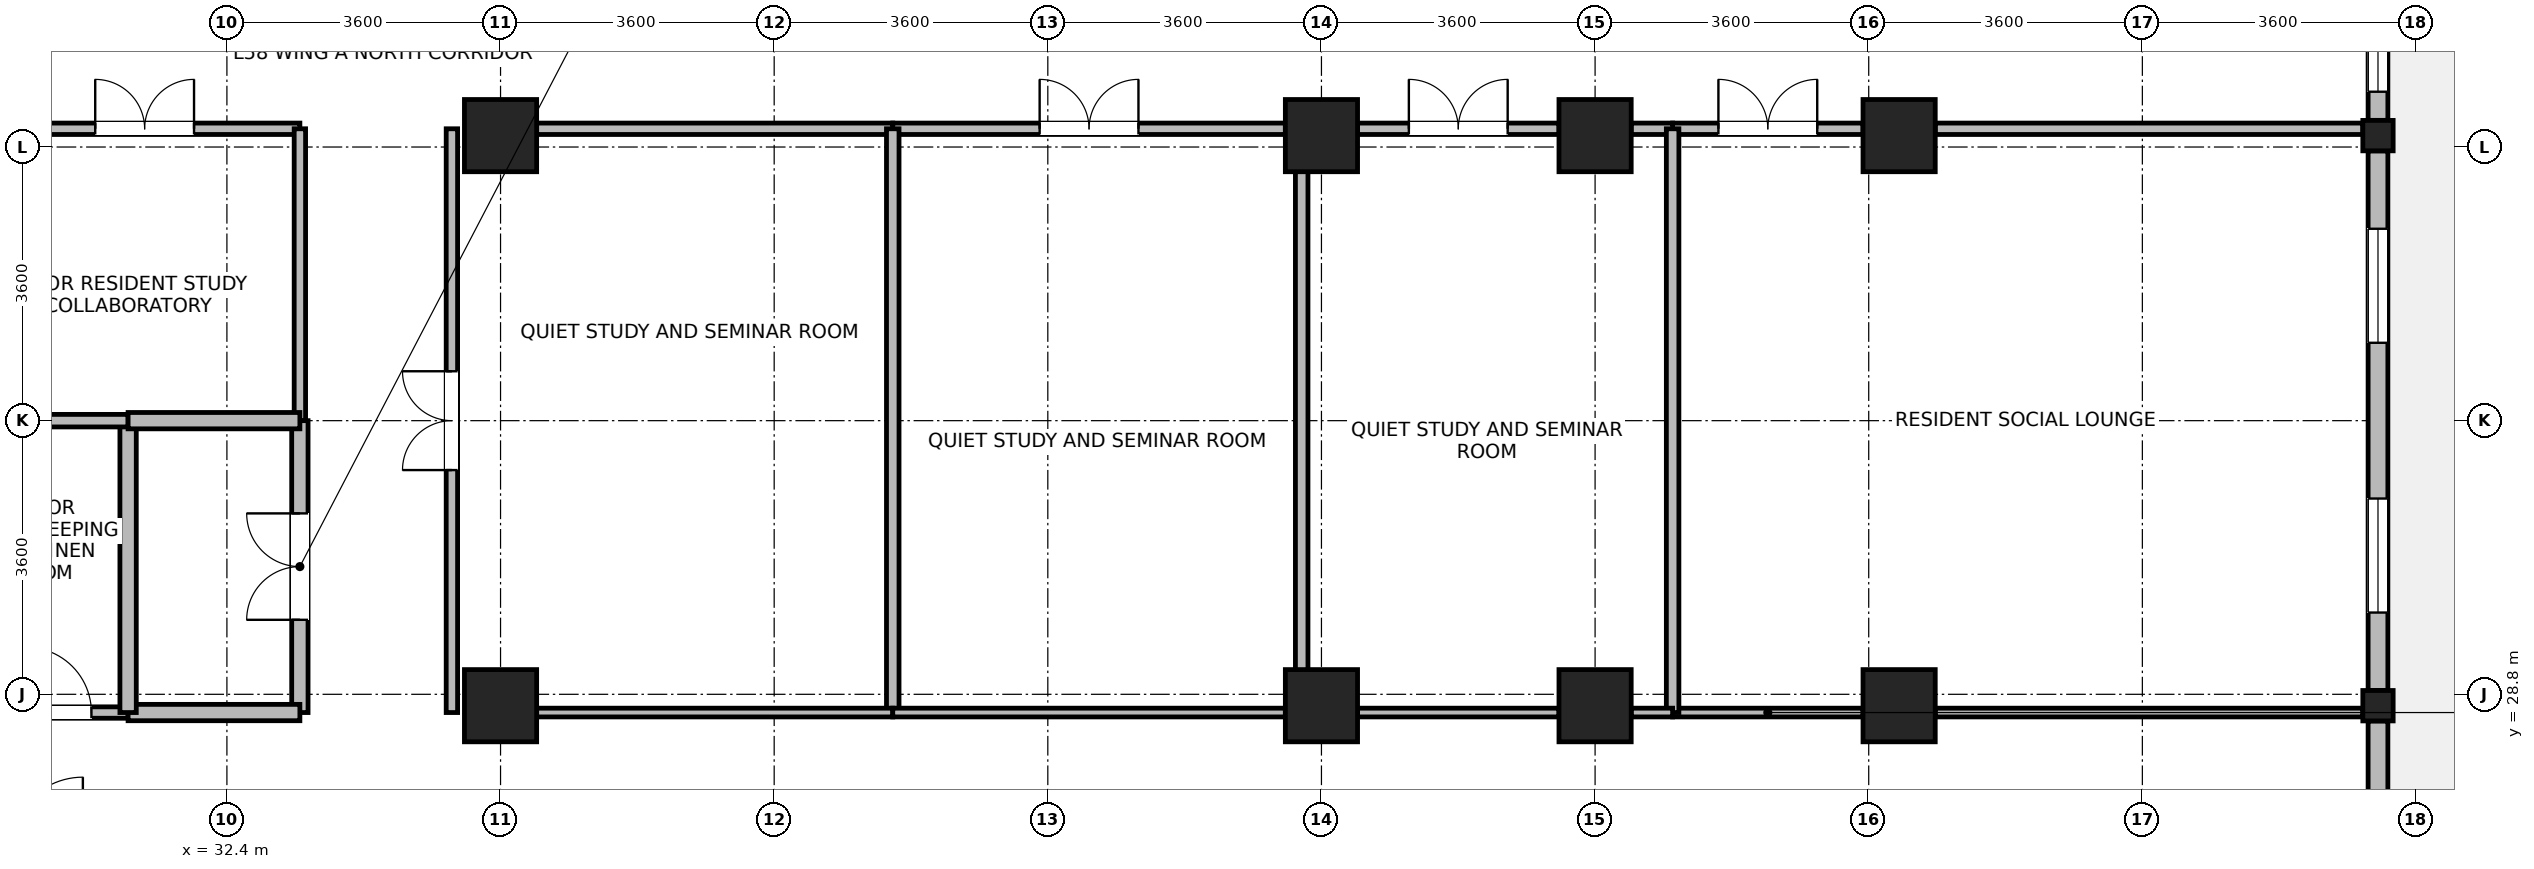
"""IFC4 building model, lengths in metres.
Left out: names, types, materials, properties, quantities, classifications, styles, units other than length and angle.
Written with IfcOpenShell. Run it as: python <this file> out.ifc"""

import sys

from ifc_helpers import new_model, si_unit, direction, frame, frame_2d, origin, origin_2d, place, context, subcontext, project, spatial, rectangle, i_section, extrude, source, transform, mapped, element, fill, save


model = new_model("IFC4")
c1 = context("Model", 3, precision=1e-05, world=origin(), true_north=direction((0.0, 1.0)))
c2 = subcontext(c1, "Body", "Model", "MODEL_VIEW")
j1 = project(units=[si_unit("LENGTHUNIT", "METRE"), si_unit("PLANEANGLEUNIT", "RADIAN")], contexts=[c1])
p1 = place(None, origin())
s1 = spatial("IfcSite", under=j1, at=p1, CompositionType="ELEMENT")
p2 = place(p1, origin())
s2 = spatial("IfcBuilding", under=s1, at=p2, CompositionType="ELEMENT")
p3 = place(p2, frame((0.0, 0.0, 227.7)))
s3 = spatial("IfcBuildingStorey", under=s2, at=p3, CompositionType="ELEMENT", Elevation=227.7)
m1 = source(origin(), c2, "Body", "SweptSolid", [
    extrude(rectangle(XDim=0.95, YDim=0.95, at=origin_2d()), origin(), (0.0, 0.0, 1.0), 3.7),
])
for number, where, z_axis, x_axis in (
    (1, (36.0, 28.65, 0.0), (0.0, 0.0, 1.0), (1.0, 0.0, 0.0)),
    (2, (36.0, 36.15, 0.0), (0.0, 0.0, 1.0), (1.0, 0.0, 0.0)),
    (3, (46.8, 28.65, 0.0), (0.0, 0.0, 1.0), (1.0, 0.0, 0.0)),
    (4, (46.8, 36.15, 0.0), (0.0, 0.0, 1.0), (1.0, 0.0, 0.0)),
    (5, (50.4, 28.65, 0.0), (0.0, 0.0, 1.0), (1.0, 0.0, 0.0)),
    (6, (50.4, 36.15, 0.0), (0.0, 0.0, 1.0), (1.0, 0.0, 0.0)),
    (7, (54.4, 28.65, 0.0), (0.0, 0.0, 1.0), (1.0, 0.0, 0.0)),
    (8, (54.4, 36.15, 0.0), (0.0, 0.0, 1.0), (1.0, 0.0, 0.0)),
):
    element("IfcColumn", number, at=place(p3, frame(where, z_axis=z_axis, x_axis=x_axis)), inside=s3, PredefinedType="COLUMN", context=c2, shape_type="MappedRepresentation", body=[
        mapped(m1, transform((0.0, 0.0, 0.0), x_axis=(1.0, 0.0, 0.0), y_axis=(0.0, 1.0, 0.0), z_axis=(0.0, 0.0, 1.0), scale=1.0)),
    ])
m2 = source(origin(), c2, "Body", "SweptSolid", [
    extrude(i_section(OverallWidth=0.399, OverallDepth=0.4, WebThickness=0.017, FlangeThickness=0.023, FilletRadius=0.015, at=origin_2d()), origin(), (0.0, 0.0, 1.0), 3.7),
])
for number, where, z_axis, x_axis in (
    (9, (60.7, 28.65, 0.0), (0.0, 0.0, 1.0), (1.0, 0.0, 0.0)),
    (10, (60.7, 36.15, 0.0), (0.0, 0.0, 1.0), (1.0, 0.0, 0.0)),
):
    element("IfcColumn", number, at=place(p3, frame(where, z_axis=z_axis, x_axis=x_axis)), inside=s3, PredefinedType="COLUMN", context=c2, shape_type="MappedRepresentation", body=[
        mapped(m2, transform((0.0, 0.0, 0.0), x_axis=(1.0, 0.0, 0.0), y_axis=(0.0, 1.0, 0.0), z_axis=(0.0, 0.0, 1.0), scale=1.0)),
    ])
p4 = place(p3, frame((60.7, 28.449, 0.0), z_axis=(0.0, 0.0, 1.0), x_axis=(0.0, -1.0, 0.0)))
e11 = element("IfcWall", 11, at=p4, inside=s3, PredefinedType="STANDARD", context=c2, shape_type="SweptSolid", body=[
    extrude(rectangle(XDim=6.648, YDim=0.26, at=frame_2d((3.324, 0.0))), origin(), (0.0, 0.0, 1.0), 3.05),
])
p5 = place(p4, frame((4.236, 0.0, 0.85)))
e12 = element("IfcOpeningElement", 12, at=p5, cuts=e11, PredefinedType="OPENING", context=c2, shape_type="SweptSolid", body=[
    extrude(rectangle(XDim=1.5, YDim=1.85, at=frame_2d((0.75, 0.925))), frame((0.0, 0.14, 0.0), z_axis=(0.0, -1.0, 0.0), x_axis=(1.0, 0.0, 0.0)), (0.0, 0.0, 1.0), 0.28),
])
p6 = place(p4, frame((2.849, 0.0, 0.85)))
e13 = element("IfcOpeningElement", 13, at=p6, cuts=e11, PredefinedType="OPENING", context=c2, shape_type="SweptSolid", body=[
    extrude(rectangle(XDim=0.95, YDim=1.75, at=frame_2d((0.475, 0.875))), frame((0.0, 0.14, 0.0), z_axis=(0.0, -1.0, 0.0), x_axis=(1.0, 0.0, 0.0)), (0.0, 0.0, 1.0), 0.28),
])
p7 = place(p3, frame((60.7, 35.949, 0.0), z_axis=(0.0, 0.0, 1.0), x_axis=(0.0, -1.0, 0.0)))
e14 = element("IfcWall", 14, at=p7, inside=s3, PredefinedType="STANDARD", context=c2, shape_type="SweptSolid", body=[
    extrude(rectangle(XDim=7.098, YDim=0.26, at=frame_2d((3.549, 0.0))), origin(), (0.0, 0.0, 1.0), 3.05),
])
p8 = place(p7, frame((1.024, 0.0, 0.85)))
e15 = element("IfcOpeningElement", 15, at=p8, cuts=e14, PredefinedType="OPENING", context=c2, shape_type="SweptSolid", body=[
    extrude(rectangle(XDim=1.5, YDim=1.85, at=frame_2d((0.75, 0.925))), frame((0.0, 0.14, 0.0), z_axis=(0.0, -1.0, 0.0), x_axis=(1.0, 0.0, 0.0)), (0.0, 0.0, 1.0), 0.28),
])
p9 = place(p7, frame((4.573, 0.0, 0.85)))
e16 = element("IfcOpeningElement", 16, at=p9, cuts=e14, PredefinedType="OPENING", context=c2, shape_type="SweptSolid", body=[
    extrude(rectangle(XDim=1.5, YDim=1.85, at=frame_2d((0.75, 0.925))), frame((0.0, 0.14, 0.0), z_axis=(0.0, -1.0, 0.0), x_axis=(1.0, 0.0, 0.0)), (0.0, 0.0, 1.0), 0.28),
])
p10 = place(p3, frame((60.7, 39.73, 0.0), z_axis=(0.0, 0.0, 1.0), x_axis=(0.0, -1.0, 0.0)))
e17 = element("IfcWall", 17, at=p10, inside=s3, PredefinedType="STANDARD", context=c2, shape_type="SweptSolid", body=[
    extrude(rectangle(XDim=3.379, YDim=0.26, at=frame_2d((1.689, 0.0))), origin(), (0.0, 0.0, 1.0), 3.45),
])
p11 = place(p10, frame((2.052, 0.0, 0.85)))
e18 = element("IfcOpeningElement", 18, at=p11, cuts=e17, PredefinedType="OPENING", context=c2, shape_type="SweptSolid", body=[
    extrude(rectangle(XDim=0.95, YDim=1.75, at=frame_2d((0.475, 0.875))), frame((0.0, 0.14, 0.0), z_axis=(0.0, -1.0, 0.0), x_axis=(1.0, 0.0, 0.0)), (0.0, 0.0, 1.0), 0.28),
])
p12 = place(p10, frame((0.268, 0.0, 0.85)))
e19 = element("IfcOpeningElement", 19, at=p12, cuts=e17, PredefinedType="OPENING", context=c2, shape_type="SweptSolid", body=[
    extrude(rectangle(XDim=0.95, YDim=1.75, at=frame_2d((0.475, 0.875))), frame((0.0, 0.14, 0.0), z_axis=(0.0, -1.0, 0.0), x_axis=(1.0, 0.0, 0.0)), (0.0, 0.0, 1.0), 0.28),
])
p13 = place(p3, frame((51.42, 36.24, 0.0), z_axis=(0.0, 0.0, 1.0), x_axis=(1.0, 0.0, 0.0)))
e20 = element("IfcWall", 20, at=p13, inside=s3, PredefinedType="PARTITIONING", context=c2, shape_type="SweptSolid", body=[
    extrude(rectangle(XDim=2.505, YDim=0.15, at=frame_2d((1.252, 0.0))), origin(), (0.0, 0.0, 1.0), 2.9),
])
p14 = place(p13, frame((0.603, 0.0, 0.0)))
e21 = element("IfcOpeningElement", 21, at=p14, cuts=e20, PredefinedType="OPENING", context=c2, shape_type="SweptSolid", body=[
    extrude(rectangle(XDim=1.3, YDim=2.12, at=frame_2d((0.65, 1.06))), frame((0.0, 0.085, 0.0), z_axis=(0.0, -1.0, 0.0), x_axis=(1.0, 0.0, 0.0)), (0.0, 0.0, 1.0), 0.17),
])
p15 = place(p3, frame((54.875, 36.24, 0.0), z_axis=(0.0, 0.0, 1.0), x_axis=(1.0, 0.0, 0.0)))
e22 = element("IfcWall", 22, at=p15, inside=s3, PredefinedType="PARTITIONING", context=c2, shape_type="SweptSolid", body=[
    extrude(rectangle(XDim=5.625, YDim=0.15, at=frame_2d((2.813, 0.0))), origin(), (0.0, 0.0, 1.0), 2.9),
])
p16 = place(p3, frame((35.36, 28.56, 0.0), z_axis=(0.0, 0.0, 1.0), x_axis=(0.0, 1.0, 0.0)))
e23 = element("IfcWall", 23, at=p16, inside=s3, PredefinedType="PARTITIONING", context=c2, shape_type="SweptSolid", body=[
    extrude(rectangle(XDim=7.68, YDim=0.15, at=frame_2d((3.84, 0.0))), origin(), (0.0, 0.0, 1.0), 3.45),
])
p17 = place(p16, frame((3.19, 0.0, 0.0)))
e24 = element("IfcOpeningElement", 24, at=p17, cuts=e23, PredefinedType="OPENING", context=c2, shape_type="SweptSolid", body=[
    extrude(rectangle(XDim=1.3, YDim=2.12, at=frame_2d((0.65, 1.06))), frame((0.0, 0.085, 0.0), z_axis=(0.0, -1.0, 0.0), x_axis=(1.0, 0.0, 0.0)), (0.0, 0.0, 1.0), 0.17),
])
p18 = place(p3, frame((36.475, 36.24, 0.0), z_axis=(0.0, 0.0, 1.0), x_axis=(1.0, 0.0, 0.0)))
e25 = element("IfcWall", 25, at=p18, inside=s3, PredefinedType="PARTITIONING", context=c2, shape_type="SweptSolid", body=[
    extrude(rectangle(XDim=4.685, YDim=0.15, at=frame_2d((2.342, 0.0))), origin(), (0.0, 0.0, 1.0), 2.9),
])
p19 = place(p3, frame((41.16, 36.24, 0.0), z_axis=(0.0, 0.0, 1.0), x_axis=(1.0, 0.0, 0.0)))
e26 = element("IfcWall", 26, at=p19, inside=s3, PredefinedType="PARTITIONING", context=c2, shape_type="SweptSolid", body=[
    extrude(rectangle(XDim=5.165, YDim=0.15, at=frame_2d((2.583, 0.0))), origin(), (0.0, 0.0, 1.0), 2.9),
])
p20 = place(p19, frame((1.933, 0.0, 0.0)))
e27 = element("IfcOpeningElement", 27, at=p20, cuts=e26, PredefinedType="OPENING", context=c2, shape_type="SweptSolid", body=[
    extrude(rectangle(XDim=1.3, YDim=2.12, at=frame_2d((0.65, 1.06))), frame((0.0, 0.085, 0.0), z_axis=(0.0, -1.0, 0.0), x_axis=(1.0, 0.0, 0.0)), (0.0, 0.0, 1.0), 0.17),
])
p21 = place(p3, frame((47.275, 36.24, 0.0), z_axis=(0.0, 0.0, 1.0), x_axis=(1.0, 0.0, 0.0)))
e28 = element("IfcWall", 28, at=p21, inside=s3, PredefinedType="PARTITIONING", context=c2, shape_type="SweptSolid", body=[
    extrude(rectangle(XDim=2.65, YDim=0.15, at=frame_2d((1.325, 0.0))), origin(), (0.0, 0.0, 1.0), 2.9),
])
p22 = place(p21, frame((0.675, 0.0, 0.0)))
e29 = element("IfcOpeningElement", 29, at=p22, cuts=e28, PredefinedType="OPENING", context=c2, shape_type="SweptSolid", body=[
    extrude(rectangle(XDim=1.3, YDim=2.12, at=frame_2d((0.65, 1.06))), frame((0.0, 0.085, 0.0), z_axis=(0.0, -1.0, 0.0), x_axis=(1.0, 0.0, 0.0)), (0.0, 0.0, 1.0), 0.17),
])
p23 = place(p3, frame((50.875, 36.24, 0.0), z_axis=(0.0, 0.0, 1.0), x_axis=(1.0, 0.0, 0.0)))
e30 = element("IfcWall", 30, at=p23, inside=s3, PredefinedType="PARTITIONING", context=c2, shape_type="SweptSolid", body=[
    extrude(rectangle(XDim=0.545, YDim=0.15, at=frame_2d((0.272, 0.0))), origin(), (0.0, 0.0, 1.0), 2.9),
])
p24 = place(p3, frame((29.275, 36.24, 0.0), z_axis=(0.0, 0.0, 1.0), x_axis=(1.0, 0.0, 0.0)))
e31 = element("IfcWall", 31, at=p24, inside=s3, PredefinedType="PARTITIONING", context=c2, shape_type="SweptSolid", body=[
    extrude(rectangle(XDim=4.085, YDim=0.15, at=frame_2d((2.042, 0.0))), origin(), (0.0, 0.0, 1.0), 2.9),
])
p25 = place(p24, frame((1.393, 0.0, 0.0)))
e32 = element("IfcOpeningElement", 32, at=p25, cuts=e31, PredefinedType="OPENING", context=c2, shape_type="SweptSolid", body=[
    extrude(rectangle(XDim=1.3, YDim=2.12, at=frame_2d((0.65, 1.06))), frame((0.0, 0.085, 0.0), z_axis=(0.0, -1.0, 0.0), x_axis=(1.0, 0.0, 0.0)), (0.0, 0.0, 1.0), 0.17),
])
p26 = place(p3, frame((33.36, 32.4, 0.0), z_axis=(0.0, 0.0, 1.0), x_axis=(0.0, 1.0, 0.0)))
e33 = element("IfcWall", 33, at=p26, inside=s3, PredefinedType="PARTITIONING", context=c2, shape_type="SweptSolid", body=[
    extrude(rectangle(XDim=3.84, YDim=0.15, at=frame_2d((1.92, 0.0))), origin(), (0.0, 0.0, 1.0), 3.45),
])
p27 = place(p3, frame((33.36, 28.56, 0.0), z_axis=(0.0, 0.0, 1.0), x_axis=(0.0, 1.0, 0.0)))
e34 = element("IfcWall", 34, at=p27, inside=s3, PredefinedType="PARTITIONING", context=c2, shape_type="SweptSolid", body=[
    extrude(rectangle(XDim=3.84, YDim=0.215, at=frame_2d((1.92, 0.0))), origin(), (0.0, 0.0, 1.0), 3.45),
])
p28 = place(p27, frame((1.22, 0.0, 0.0)))
e35 = element("IfcOpeningElement", 35, at=p28, cuts=e34, PredefinedType="OPENING", context=c2, shape_type="SweptSolid", body=[
    extrude(rectangle(XDim=1.4, YDim=2.15, at=frame_2d((0.7, 1.075))), frame((0.0, 0.118, 0.0), z_axis=(0.0, -1.0, 0.0), x_axis=(1.0, 0.0, 0.0)), (0.0, 0.0, 1.0), 0.235),
])
p29 = place(p3, frame((29.275, 28.56, 0.0), z_axis=(0.0, 0.0, 1.0), x_axis=(1.0, 0.0, 0.0)))
e36 = element("IfcWall", 36, at=p29, inside=s3, PredefinedType="PARTITIONING", context=c2, shape_type="SweptSolid", body=[
    extrude(rectangle(XDim=1.825, YDim=0.15, at=frame_2d((0.913, 0.0))), origin(), (0.0, 0.0, 1.0), 2.9),
])
p30 = place(p29, frame((0.482, 0.0, 0.0)))
e37 = element("IfcOpeningElement", 37, at=p30, cuts=e36, PredefinedType="OPENING", context=c2, shape_type="SweptSolid", body=[
    extrude(rectangle(XDim=0.86, YDim=2.02, at=frame_2d((0.43, 1.01))), frame((0.0, 0.085, 0.0), z_axis=(0.0, -1.0, 0.0), x_axis=(1.0, 0.0, 0.0)), (0.0, 0.0, 1.0), 0.17),
])
p31 = place(p3, frame((31.1, 28.56, 0.0), z_axis=(0.0, 0.0, 1.0), x_axis=(1.0, 0.0, 0.0)))
e38 = element("IfcWall", 38, at=p31, inside=s3, PredefinedType="PARTITIONING", context=c2, shape_type="SweptSolid", body=[
    extrude(rectangle(XDim=2.26, YDim=0.215, at=frame_2d((1.13, 0.0))), origin(), (0.0, 0.0, 1.0), 2.9),
])
p32 = place(p3, frame((51.42, 28.56, 0.0), z_axis=(0.0, 0.0, 1.0), x_axis=(1.0, 0.0, 0.0)))
e39 = element("IfcWall", 39, at=p32, inside=s3, PredefinedType="PARTITIONING", context=c2, shape_type="SweptSolid", body=[
    extrude(rectangle(XDim=2.505, YDim=0.115, at=frame_2d((1.252, 0.0))), origin(), (0.0, 0.0, 1.0), 2.9),
])
p33 = place(p3, frame((54.875, 28.56, 0.0), z_axis=(0.0, 0.0, 1.0), x_axis=(1.0, 0.0, 0.0)))
e40 = element("IfcWall", 40, at=p33, inside=s3, PredefinedType="PARTITIONING", context=c2, shape_type="SweptSolid", body=[
    extrude(rectangle(XDim=5.625, YDim=0.115, at=frame_2d((2.813, 0.0))), origin(), (0.0, 0.0, 1.0), 2.9),
])
for number, where, z_axis, x_axis in (
    (41, (41.16, 28.56, 0.0), (0.0, 0.0, 1.0), (0.0, 1.0, 0.0)),
    (42, (46.54, 28.56, 0.0), (0.0, 0.0, 1.0), (0.0, 1.0, 0.0)),
    (43, (51.42, 28.56, 0.0), (0.0, 0.0, 1.0), (0.0, 1.0, 0.0)),
):
    element("IfcWall", number, at=place(p3, frame(where, z_axis=z_axis, x_axis=x_axis)), inside=s3, PredefinedType="PARTITIONING", context=c2, shape_type="SweptSolid", body=[
        extrude(rectangle(XDim=7.68, YDim=0.165, at=frame_2d((3.84, 0.0))), origin(), (0.0, 0.0, 1.0), 3.45),
    ])
p34 = place(p3, frame((36.475, 28.56, 0.0), z_axis=(0.0, 0.0, 1.0), x_axis=(1.0, 0.0, 0.0)))
e44 = element("IfcWall", 44, at=p34, inside=s3, PredefinedType="PARTITIONING", context=c2, shape_type="SweptSolid", body=[
    extrude(rectangle(XDim=4.685, YDim=0.115, at=frame_2d((2.342, 0.0))), origin(), (0.0, 0.0, 1.0), 2.9),
])
p35 = place(p3, frame((41.16, 28.56, 0.0), z_axis=(0.0, 0.0, 1.0), x_axis=(1.0, 0.0, 0.0)))
e45 = element("IfcWall", 45, at=p35, inside=s3, PredefinedType="PARTITIONING", context=c2, shape_type="SweptSolid", body=[
    extrude(rectangle(XDim=5.165, YDim=0.115, at=frame_2d((2.583, 0.0))), origin(), (0.0, 0.0, 1.0), 2.9),
])
p36 = place(p3, frame((47.275, 28.56, 0.0), z_axis=(0.0, 0.0, 1.0), x_axis=(1.0, 0.0, 0.0)))
e46 = element("IfcWall", 46, at=p36, inside=s3, PredefinedType="PARTITIONING", context=c2, shape_type="SweptSolid", body=[
    extrude(rectangle(XDim=2.65, YDim=0.115, at=frame_2d((1.325, 0.0))), origin(), (0.0, 0.0, 1.0), 2.9),
])
p37 = place(p3, frame((50.875, 28.56, 0.0), z_axis=(0.0, 0.0, 1.0), x_axis=(1.0, 0.0, 0.0)))
e47 = element("IfcWall", 47, at=p37, inside=s3, PredefinedType="PARTITIONING", context=c2, shape_type="SweptSolid", body=[
    extrude(rectangle(XDim=0.545, YDim=0.115, at=frame_2d((0.272, 0.0))), origin(), (0.0, 0.0, 1.0), 2.9),
])
p38 = place(p3, frame((31.1, 28.56, 0.0), z_axis=(0.0, 0.0, 1.0), x_axis=(0.0, 1.0, 0.0)))
e48 = element("IfcWall", 48, at=p38, inside=s3, PredefinedType="PARTITIONING", context=c2, shape_type="SweptSolid", body=[
    extrude(rectangle(XDim=3.84, YDim=0.215, at=frame_2d((1.92, 0.0))), origin(), (0.0, 0.0, 1.0), 3.45),
])
p39 = place(p3, frame((28.84, 32.4, 0.0), z_axis=(0.0, 0.0, 1.0), x_axis=(1.0, 0.0, 0.0)))
e49 = element("IfcWall", 49, at=p39, inside=s3, PredefinedType="PARTITIONING", context=c2, shape_type="SweptSolid", body=[
    extrude(rectangle(XDim=2.26, YDim=0.165, at=frame_2d((1.13, 0.0))), origin(), (0.0, 0.0, 1.0), 3.45),
])
p40 = place(p3, frame((31.1, 32.4, 0.0), z_axis=(0.0, 0.0, 1.0), x_axis=(1.0, 0.0, 0.0)))
e50 = element("IfcWall", 50, at=p40, inside=s3, PredefinedType="PARTITIONING", context=c2, shape_type="SweptSolid", body=[
    extrude(rectangle(XDim=2.26, YDim=0.215, at=frame_2d((1.13, 0.0))), origin(), (0.0, 0.0, 1.0), 3.45),
])
p41 = place(p8, origin())
e51 = element("IfcWindow", 51, at=p41, inside=s3, PartitioningType="SINGLE_PANEL", PredefinedType="WINDOW", context=c2, shape_type="SweptSolid", body=[
    extrude(rectangle(XDim=1.5, YDim=1.85, at=frame_2d((0.75, 0.925))), frame((0.0, 0.03, 0.0), z_axis=(0.0, -1.0, 0.0), x_axis=(1.0, 0.0, 0.0)), (0.0, 0.0, 1.0), 0.06),
])
fill(e15, e51)
p42 = place(p9, origin())
e52 = element("IfcWindow", 52, at=p42, inside=s3, PartitioningType="SINGLE_PANEL", PredefinedType="WINDOW", context=c2, shape_type="SweptSolid", body=[
    extrude(rectangle(XDim=1.5, YDim=1.85, at=frame_2d((0.75, 0.925))), frame((0.0, 0.03, 0.0), z_axis=(0.0, -1.0, 0.0), x_axis=(1.0, 0.0, 0.0)), (0.0, 0.0, 1.0), 0.06),
])
fill(e16, e52)
p43 = place(p11, origin())
e53 = element("IfcWindow", 53, at=p43, inside=s3, PartitioningType="SINGLE_PANEL", PredefinedType="WINDOW", context=c2, shape_type="SweptSolid", body=[
    extrude(rectangle(XDim=0.95, YDim=1.75, at=frame_2d((0.475, 0.875))), frame((0.0, 0.03, 0.0), z_axis=(0.0, -1.0, 0.0), x_axis=(1.0, 0.0, 0.0)), (0.0, 0.0, 1.0), 0.06),
])
fill(e18, e53)
p44 = place(p14, origin())
e54 = element("IfcDoor", 54, at=p44, inside=s3, OperationType="DOUBLE_DOOR_SINGLE_SWING", PredefinedType="DOOR", context=c2, shape_type="SweptSolid", body=[
    extrude(rectangle(XDim=1.3, YDim=2.12, at=frame_2d((0.65, 1.06))), frame((0.0, 0.025, 0.0), z_axis=(0.0, -1.0, 0.0), x_axis=(1.0, 0.0, 0.0)), (0.0, 0.0, 1.0), 0.05),
])
fill(e21, e54)
p45 = place(p17, origin())
e55 = element("IfcDoor", 55, at=p45, inside=s3, OperationType="DOUBLE_DOOR_SINGLE_SWING", PredefinedType="DOOR", context=c2, shape_type="SweptSolid", body=[
    extrude(rectangle(XDim=1.3, YDim=2.12, at=frame_2d((0.65, 1.06))), frame((0.0, 0.025, 0.0), z_axis=(0.0, -1.0, 0.0), x_axis=(1.0, 0.0, 0.0)), (0.0, 0.0, 1.0), 0.05),
])
fill(e24, e55)
p46 = place(p20, origin())
e56 = element("IfcDoor", 56, at=p46, inside=s3, OperationType="DOUBLE_DOOR_SINGLE_SWING", PredefinedType="DOOR", context=c2, shape_type="SweptSolid", body=[
    extrude(rectangle(XDim=1.3, YDim=2.12, at=frame_2d((0.65, 1.06))), frame((0.0, 0.025, 0.0), z_axis=(0.0, -1.0, 0.0), x_axis=(1.0, 0.0, 0.0)), (0.0, 0.0, 1.0), 0.05),
])
fill(e27, e56)
p47 = place(p22, origin())
e57 = element("IfcDoor", 57, at=p47, inside=s3, OperationType="DOUBLE_DOOR_SINGLE_SWING", PredefinedType="DOOR", context=c2, shape_type="SweptSolid", body=[
    extrude(rectangle(XDim=1.3, YDim=2.12, at=frame_2d((0.65, 1.06))), frame((0.0, 0.025, 0.0), z_axis=(0.0, -1.0, 0.0), x_axis=(1.0, 0.0, 0.0)), (0.0, 0.0, 1.0), 0.05),
])
fill(e29, e57)
p48 = place(p25, origin())
e58 = element("IfcDoor", 58, at=p48, inside=s3, OperationType="DOUBLE_DOOR_SINGLE_SWING", PredefinedType="DOOR", context=c2, shape_type="SweptSolid", body=[
    extrude(rectangle(XDim=1.3, YDim=2.12, at=frame_2d((0.65, 1.06))), frame((0.0, 0.025, 0.0), z_axis=(0.0, -1.0, 0.0), x_axis=(1.0, 0.0, 0.0)), (0.0, 0.0, 1.0), 0.05),
])
fill(e32, e58)
p49 = place(p28, origin())
e59 = element("IfcDoor", 59, at=p49, inside=s3, OperationType="DOUBLE_DOOR_SINGLE_SWING", PredefinedType="DOOR", context=c2, shape_type="SweptSolid", body=[
    extrude(rectangle(XDim=1.4, YDim=2.15, at=frame_2d((0.7, 1.075))), frame((0.0, 0.025, 0.0), z_axis=(0.0, -1.0, 0.0), x_axis=(1.0, 0.0, 0.0)), (0.0, 0.0, 1.0), 0.05),
])
fill(e35, e59)
p50 = place(p30, origin())
e60 = element("IfcDoor", 60, at=p50, inside=s3, OperationType="SINGLE_SWING_LEFT", PredefinedType="DOOR", context=c2, shape_type="SweptSolid", body=[
    extrude(rectangle(XDim=0.86, YDim=2.02, at=frame_2d((0.43, 1.01))), frame((0.0, 0.025, 0.0), z_axis=(0.0, -1.0, 0.0), x_axis=(1.0, 0.0, 0.0)), (0.0, 0.0, 1.0), 0.05),
])
fill(e37, e60)
save(model, sys.argv[1])
